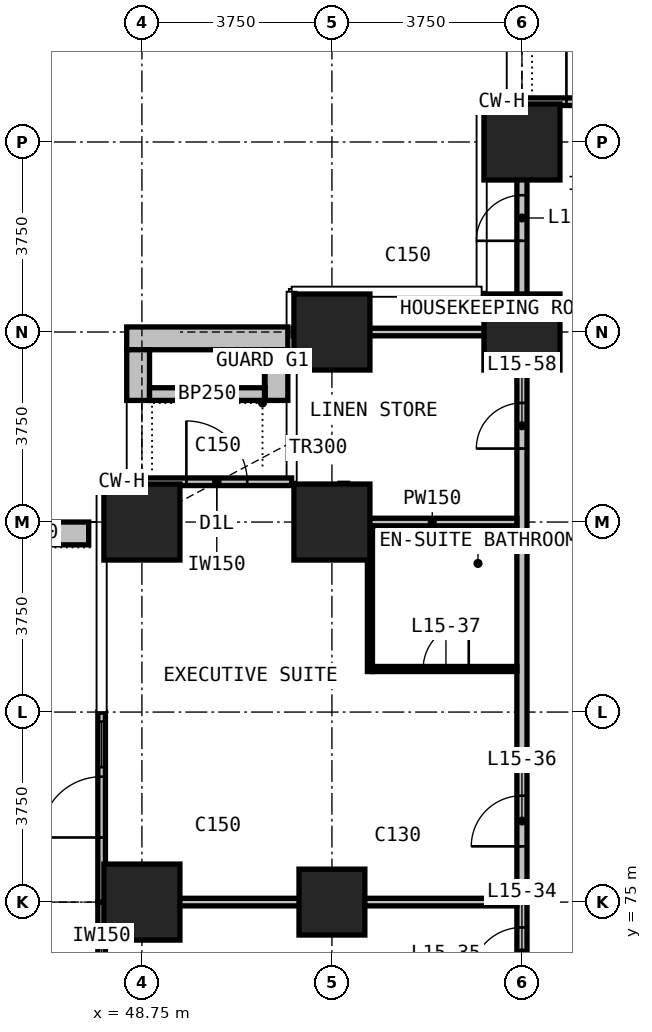
"""IFC4 building model, lengths in metres.
Left out: names, types, materials, properties, quantities, classifications, styles, units other than length and angle.
Written with IfcOpenShell. Run it as: python <this file> out.ifc"""

import sys

from ifc_helpers import new_model, si_unit, direction, frame, frame_2d, origin, origin_2d, place, context, subcontext, project, spatial, rectangle, extrude, element, fill, save


model = new_model("IFC4")
c1 = context("Model", 3, precision=1e-05, world=origin(), true_north=direction((0.0, 1.0)))
c2 = subcontext(c1, "Body", "Model", "MODEL_VIEW")
j1 = project(units=[si_unit("LENGTHUNIT", "METRE"), si_unit("PLANEANGLEUNIT", "RADIAN")], contexts=[c1])
p1 = place(None, origin())
s1 = spatial("IfcSite", under=j1, at=p1, CompositionType="ELEMENT")
p2 = place(p1, origin())
s2 = spatial("IfcBuilding", under=s1, at=p2, CompositionType="ELEMENT")
p3 = place(p2, frame((0.0, 0.0, 69.2)))
s3 = spatial("IfcBuildingStorey", under=s2, at=p3, CompositionType="ELEMENT", Elevation=69.2)
for number, where, z_axis, x_axis in (
    (1, (48.75, 75.0, 0.0), (0.0, 0.0, 1.0), (1.0, 0.0, 0.0)),
    (2, (48.75, 82.5, 0.0), (0.0, 0.0, 1.0), (1.0, 0.0, 0.0)),
):
    element("IfcColumn", number, at=place(p3, frame(where, z_axis=z_axis, x_axis=x_axis)), inside=s3, PredefinedType="COLUMN", context=c2, shape_type="SweptSolid", body=[
        extrude(rectangle(XDim=1.5, YDim=1.5, at=origin_2d()), origin(), (0.0, 0.0, 1.0), 3.3),
    ])
p4 = place(p3, frame((52.5, 75.0, 0.0), z_axis=(0.0, 0.0, 1.0), x_axis=(1.0, 0.0, 0.0)))
e3 = element("IfcColumn", 3, at=p4, inside=s3, PredefinedType="COLUMN", context=c2, shape_type="SweptSolid", body=[
    extrude(rectangle(XDim=1.3, YDim=1.3, at=origin_2d()), origin(), (0.0, 0.0, 1.0), 3.3),
])
for number, where, z_axis, x_axis in (
    (4, (52.5, 82.5, 0.0), (0.0, 0.0, 1.0), (1.0, 0.0, 0.0)),
    (5, (52.5, 86.25, 0.0), (0.0, 0.0, 1.0), (1.0, 0.0, 0.0)),
    (6, (56.25, 86.25, 0.0), (0.0, 0.0, 1.0), (1.0, 0.0, 0.0)),
    (7, (56.25, 90.0, 0.0), (0.0, 0.0, 1.0), (1.0, 0.0, 0.0)),
):
    element("IfcColumn", number, at=place(p3, frame(where, z_axis=z_axis, x_axis=x_axis)), inside=s3, PredefinedType="COLUMN", context=c2, shape_type="SweptSolid", body=[
        extrude(rectangle(XDim=1.5, YDim=1.5, at=origin_2d()), origin(), (0.0, 0.0, 1.0), 3.3),
    ])
p5 = place(p3, frame((56.25, 90.795, 0.0), z_axis=(0.0, 0.0, 1.0), x_axis=(1.0, 0.0, 0.0)))
e8 = element("IfcWall", 8, at=p5, inside=s3, PredefinedType="SOLIDWALL", context=c2, shape_type="SweptSolid", body=[
    extrude(rectangle(XDim=2.955, YDim=0.15, at=frame_2d((1.478, 0.0))), origin(), (0.0, 0.0, 1.0), 3.0),
])
p6 = place(p5, frame((0.877, 0.0, 0.0)))
e9 = element("IfcOpeningElement", 9, at=p6, cuts=e8, PredefinedType="OPENING", context=c2, shape_type="SweptSolid", body=[
    extrude(rectangle(XDim=1.2, YDim=2.4, at=frame_2d((0.6, 1.2))), frame((0.0, 0.085, 0.0), z_axis=(0.0, -1.0, 0.0), x_axis=(1.0, 0.0, 0.0)), (0.0, 0.0, 1.0), 0.17),
])
p7 = place(p3, frame((48.75, 83.295, 0.0), z_axis=(0.0, 0.0, 1.0), x_axis=(1.0, 0.0, 0.0)))
e10 = element("IfcWall", 10, at=p7, inside=s3, PredefinedType="SOLIDWALL", context=c2, shape_type="SweptSolid", body=[
    extrude(rectangle(XDim=2.955, YDim=0.15, at=frame_2d((1.478, 0.0))), origin(), (0.0, 0.0, 1.0), 3.0),
])
p8 = place(p7, frame((0.877, 0.0, 0.0)))
e11 = element("IfcOpeningElement", 11, at=p8, cuts=e10, PredefinedType="OPENING", context=c2, shape_type="SweptSolid", body=[
    extrude(rectangle(XDim=1.2, YDim=2.0, at=frame_2d((0.6, 1.0))), frame((0.0, 0.085, 0.0), z_axis=(0.0, -1.0, 0.0), x_axis=(1.0, 0.0, 0.0)), (0.0, 0.0, 1.0), 0.17),
])
p9 = place(p3, frame((47.955, 71.25, 0.0), z_axis=(0.0, 0.0, 1.0), x_axis=(0.0, 1.0, 0.0)))
e12 = element("IfcWall", 12, at=p9, inside=s3, PredefinedType="SOLIDWALL", context=c2, shape_type="SweptSolid", body=[
    extrude(rectangle(XDim=3.75, YDim=0.15, at=frame_2d((1.875, 0.0))), origin(), (0.0, 0.0, 1.0), 3.0),
])
p10 = place(p9, frame((0.188, 0.0, 0.1)))
e13 = element("IfcOpeningElement", 13, at=p10, cuts=e12, PredefinedType="OPENING", context=c2, shape_type="SweptSolid", body=[
    extrude(rectangle(XDim=0.9, YDim=2.4, at=frame_2d((0.45, 1.2))), frame((0.0, 0.085, 0.0), z_axis=(0.0, -1.0, 0.0), x_axis=(1.0, 0.0, 0.0)), (0.0, 0.0, 1.0), 0.17),
])
p11 = place(p9, frame((1.275, 0.0, 0.0)))
e14 = element("IfcOpeningElement", 14, at=p11, cuts=e12, PredefinedType="OPENING", context=c2, shape_type="SweptSolid", body=[
    extrude(rectangle(XDim=1.2, YDim=2.4, at=frame_2d((0.6, 1.2))), frame((0.0, 0.085, 0.0), z_axis=(0.0, -1.0, 0.0), x_axis=(1.0, 0.0, 0.0)), (0.0, 0.0, 1.0), 0.17),
])
p12 = place(p3, frame((47.955, 75.0, 0.0), z_axis=(0.0, 0.0, 1.0), x_axis=(0.0, 1.0, 0.0)))
e15 = element("IfcWall", 15, at=p12, inside=s3, PredefinedType="SOLIDWALL", context=c2, shape_type="SweptSolid", body=[
    extrude(rectangle(XDim=3.75, YDim=0.15, at=frame_2d((1.875, 0.0))), origin(), (0.0, 0.0, 1.0), 3.0),
])
p13 = place(p12, frame((1.275, 0.0, 0.0)))
e16 = element("IfcOpeningElement", 16, at=p13, cuts=e15, PredefinedType="OPENING", context=c2, shape_type="SweptSolid", body=[
    extrude(rectangle(XDim=1.2, YDim=2.4, at=frame_2d((0.6, 1.2))), frame((0.0, 0.085, 0.0), z_axis=(0.0, -1.0, 0.0), x_axis=(1.0, 0.0, 0.0)), (0.0, 0.0, 1.0), 0.17),
])
p14 = place(p12, frame((2.663, 0.0, 0.1)))
e17 = element("IfcOpeningElement", 17, at=p14, cuts=e15, PredefinedType="OPENING", context=c2, shape_type="SweptSolid", body=[
    extrude(rectangle(XDim=0.9, YDim=2.4, at=frame_2d((0.45, 1.2))), frame((0.0, 0.085, 0.0), z_axis=(0.0, -1.0, 0.0), x_axis=(1.0, 0.0, 0.0)), (0.0, 0.0, 1.0), 0.17),
])
p15 = place(p3, frame((48.45, 86.125, 0.0), z_axis=(0.0, 0.0, 1.0), x_axis=(1.0, 0.0, 0.0)))
e18 = element("IfcWall", 18, at=p15, inside=s3, PredefinedType="USERDEFINED", context=c2, shape_type="SweptSolid", body=[
    extrude(rectangle(XDim=3.18, YDim=0.45, at=frame_2d((1.59, 0.0))), origin(), (0.0, 0.0, 1.0), 1.1),
])
for number, where, z_axis, x_axis in (
    (19, (48.675, 84.9, 0.0), (0.0, 0.0, 1.0), (0.0, 1.0, 0.0)),
    (20, (51.405, 84.9, 0.0), (0.0, 0.0, 1.0), (0.0, 1.0, 0.0)),
):
    element("IfcWall", number, at=place(p3, frame(where, z_axis=z_axis, x_axis=x_axis)), inside=s3, PredefinedType="USERDEFINED", context=c2, shape_type="SweptSolid", body=[
        extrude(rectangle(XDim=1.0, YDim=0.45, at=frame_2d((0.5, 0.0))), origin(), (0.0, 0.0, 1.0), 1.1),
    ])
p16 = place(p3, frame((48.9, 85.025, 0.0), z_axis=(0.0, 0.0, 1.0), x_axis=(1.0, 0.0, 0.0)))
e21 = element("IfcWall", 21, at=p16, inside=s3, PredefinedType="USERDEFINED", context=c2, shape_type="SweptSolid", body=[
    extrude(rectangle(XDim=2.28, YDim=0.25, at=frame_2d((1.14, 0.0))), origin(), (0.0, 0.0, 1.0), 1.0),
])
p17 = place(p3, frame((47.7, 82.275, 0.0), z_axis=(0.0, 0.0, 1.0), x_axis=(-1.0, 0.0, 0.0)))
e22 = element("IfcWall", 22, at=p17, inside=s3, PredefinedType="USERDEFINED", context=c2, shape_type="SweptSolid", body=[
    extrude(rectangle(XDim=2.35, YDim=0.45, at=frame_2d((1.175, 0.0))), origin(), (0.0, 0.0, 1.0), 1.1),
])
p18 = place(p3, frame((56.25, 52.4, 0.0), z_axis=(0.0, 0.0, 1.0), x_axis=(0.0, 1.0, 0.0)))
e23 = element("IfcWall", 23, at=p18, inside=s3, PredefinedType="PARTITIONING", context=c2, shape_type="SweptSolid", body=[
    extrude(rectangle(XDim=38.31, YDim=0.2, at=frame_2d((19.155, 0.0))), origin(), (0.0, 0.0, 1.0), 3.0),
])
p19 = place(p18, frame((2.35, 0.0, 0.0)))
e24 = element("IfcOpeningElement", 24, at=p19, cuts=e23, PredefinedType="OPENING", context=c2, shape_type="SweptSolid", body=[
    extrude(rectangle(XDim=1.0, YDim=2.2, at=frame_2d((0.5, 1.1))), frame((0.0, 0.11, 0.0), z_axis=(0.0, -1.0, 0.0), x_axis=(1.0, 0.0, 0.0)), (0.0, 0.0, 1.0), 0.22),
])
p20 = place(p18, frame((4.35, 0.0, 0.0)))
e25 = element("IfcOpeningElement", 25, at=p20, cuts=e23, PredefinedType="OPENING", context=c2, shape_type="SweptSolid", body=[
    extrude(rectangle(XDim=1.0, YDim=2.2, at=frame_2d((0.5, 1.1))), frame((0.0, 0.11, 0.0), z_axis=(0.0, -1.0, 0.0), x_axis=(1.0, 0.0, 0.0)), (0.0, 0.0, 1.0), 0.22),
])
p21 = place(p18, frame((13.0, 0.0, 0.0)))
e26 = element("IfcOpeningElement", 26, at=p21, cuts=e23, PredefinedType="OPENING", context=c2, shape_type="SweptSolid", body=[
    extrude(rectangle(XDim=1.0, YDim=2.2, at=frame_2d((0.5, 1.1))), frame((0.0, 0.11, 0.0), z_axis=(0.0, -1.0, 0.0), x_axis=(1.0, 0.0, 0.0)), (0.0, 0.0, 1.0), 0.22),
])
p22 = place(p18, frame((15.6, 0.0, 0.0)))
e27 = element("IfcOpeningElement", 27, at=p22, cuts=e23, PredefinedType="OPENING", context=c2, shape_type="SweptSolid", body=[
    extrude(rectangle(XDim=1.0, YDim=2.2, at=frame_2d((0.5, 1.1))), frame((0.0, 0.11, 0.0), z_axis=(0.0, -1.0, 0.0), x_axis=(1.0, 0.0, 0.0)), (0.0, 0.0, 1.0), 0.22),
])
p23 = place(p18, frame((21.1, 0.0, 0.0)))
e28 = element("IfcOpeningElement", 28, at=p23, cuts=e23, PredefinedType="OPENING", context=c2, shape_type="SweptSolid", body=[
    extrude(rectangle(XDim=1.0, YDim=2.2, at=frame_2d((0.5, 1.1))), frame((0.0, 0.11, 0.0), z_axis=(0.0, -1.0, 0.0), x_axis=(1.0, 0.0, 0.0)), (0.0, 0.0, 1.0), 0.22),
])
p24 = place(p18, frame((23.7, 0.0, 0.0)))
e29 = element("IfcOpeningElement", 29, at=p24, cuts=e23, PredefinedType="OPENING", context=c2, shape_type="SweptSolid", body=[
    extrude(rectangle(XDim=1.0, YDim=2.2, at=frame_2d((0.5, 1.1))), frame((0.0, 0.11, 0.0), z_axis=(0.0, -1.0, 0.0), x_axis=(1.0, 0.0, 0.0)), (0.0, 0.0, 1.0), 0.22),
])
p25 = place(p18, frame((31.55, 0.0, 0.0)))
e30 = element("IfcOpeningElement", 30, at=p25, cuts=e23, PredefinedType="OPENING", context=c2, shape_type="SweptSolid", body=[
    extrude(rectangle(XDim=0.9, YDim=2.2, at=frame_2d((0.45, 1.1))), frame((0.0, 0.11, 0.0), z_axis=(0.0, -1.0, 0.0), x_axis=(1.0, 0.0, 0.0)), (0.0, 0.0, 1.0), 0.22),
])
p26 = place(p18, frame((35.65, 0.0, 0.0)))
e31 = element("IfcOpeningElement", 31, at=p26, cuts=e23, PredefinedType="OPENING", context=c2, shape_type="SweptSolid", body=[
    extrude(rectangle(XDim=0.9, YDim=2.2, at=frame_2d((0.45, 1.1))), frame((0.0, 0.11, 0.0), z_axis=(0.0, -1.0, 0.0), x_axis=(1.0, 0.0, 0.0)), (0.0, 0.0, 1.0), 0.22),
])
p27 = place(p3, frame((48.04, 75.0, 0.0), z_axis=(0.0, 0.0, 1.0), x_axis=(1.0, 0.0, 0.0)))
e32 = element("IfcWall", 32, at=p27, inside=s3, PredefinedType="PARTITIONING", context=c2, shape_type="SweptSolid", body=[
    extrude(rectangle(XDim=8.11, YDim=0.15, at=frame_2d((4.055, 0.0))), origin(), (0.0, 0.0, 1.0), 3.0),
])
p28 = place(p3, frame((52.81, 82.5, 0.0), z_axis=(0.0, 0.0, 1.0), x_axis=(1.0, 0.0, 0.0)))
e33 = element("IfcWall", 33, at=p28, inside=s3, PredefinedType="PARTITIONING", context=c2, shape_type="SweptSolid", body=[
    extrude(rectangle(XDim=3.34, YDim=0.15, at=frame_2d((1.67, 0.0))), origin(), (0.0, 0.0, 1.0), 3.0),
])
p29 = place(p3, frame((51.735, 86.25, 0.0), z_axis=(0.0, 0.0, 1.0), x_axis=(1.0, 0.0, 0.0)))
e34 = element("IfcWall", 34, at=p29, inside=s3, PredefinedType="PARTITIONING", context=c2, shape_type="SweptSolid", body=[
    extrude(rectangle(XDim=4.415, YDim=0.15, at=frame_2d((2.208, 0.0))), origin(), (0.0, 0.0, 1.0), 3.0),
])
p30 = place(p3, frame((52.735, 82.425, 0.0), z_axis=(0.0, 0.0, 1.0), x_axis=(0.0, 1.0, 0.0)))
e35 = element("IfcWall", 35, at=p30, inside=s3, PredefinedType="PARTITIONING", context=c2, shape_type="SweptSolid", body=[
    extrude(rectangle(XDim=0.84, YDim=0.15, at=frame_2d((0.42, 0.0))), origin(), (0.0, 0.0, 1.0), 3.0),
])
p31 = place(p3, frame((53.3, 79.6, 0.0), z_axis=(0.0, 0.0, 1.0), x_axis=(1.0, 0.0, 0.0)))
e36 = element("IfcWall", 36, at=p31, inside=s3, PredefinedType="PARTITIONING", context=c2, shape_type="SweptSolid", body=[
    extrude(rectangle(XDim=2.85, YDim=0.1, at=frame_2d((1.425, 0.0))), origin(), (0.0, 0.0, 1.0), 3.0),
])
p32 = place(p31, frame((1.0, 0.0, 0.0)))
e37 = element("IfcOpeningElement", 37, at=p32, cuts=e36, PredefinedType="OPENING", context=c2, shape_type="SweptSolid", body=[
    extrude(rectangle(XDim=0.9, YDim=2.2, at=frame_2d((0.45, 1.1))), frame((0.0, 0.06, 0.0), z_axis=(0.0, -1.0, 0.0), x_axis=(1.0, 0.0, 0.0)), (0.0, 0.0, 1.0), 0.12),
])
p33 = place(p3, frame((53.25, 79.55, 0.0), z_axis=(0.0, 0.0, 1.0), x_axis=(0.0, 1.0, 0.0)))
e38 = element("IfcWall", 38, at=p33, inside=s3, PredefinedType="PARTITIONING", context=c2, shape_type="SweptSolid", body=[
    extrude(rectangle(XDim=2.875, YDim=0.1, at=frame_2d((1.438, 0.0))), origin(), (0.0, 0.0, 1.0), 3.0),
])
p34 = place(p6, origin())
e39 = element("IfcDoor", 39, at=p34, inside=s3, OperationType="SINGLE_SWING_LEFT", PredefinedType="DOOR", context=c2, shape_type="SweptSolid", body=[
    extrude(rectangle(XDim=1.2, YDim=2.4, at=frame_2d((0.6, 1.2))), frame((0.0, 0.025, 0.0), z_axis=(0.0, -1.0, 0.0), x_axis=(1.0, 0.0, 0.0)), (0.0, 0.0, 1.0), 0.05),
])
fill(e9, e39)
p35 = place(p8, origin())
e40 = element("IfcDoor", 40, at=p35, inside=s3, OperationType="SINGLE_SWING_LEFT", PredefinedType="DOOR", context=c2, shape_type="SweptSolid", body=[
    extrude(rectangle(XDim=1.2, YDim=2.0, at=frame_2d((0.6, 1.0))), frame((0.0, 0.025, 0.0), z_axis=(0.0, -1.0, 0.0), x_axis=(1.0, 0.0, 0.0)), (0.0, 0.0, 1.0), 0.05),
])
fill(e11, e40)
p36 = place(p13, origin())
e41 = element("IfcDoor", 41, at=p36, inside=s3, OperationType="SINGLE_SWING_LEFT", PredefinedType="DOOR", context=c2, shape_type="SweptSolid", body=[
    extrude(rectangle(XDim=1.2, YDim=2.4, at=frame_2d((0.6, 1.2))), frame((0.0, 0.025, 0.0), z_axis=(0.0, -1.0, 0.0), x_axis=(1.0, 0.0, 0.0)), (0.0, 0.0, 1.0), 0.05),
])
fill(e16, e41)
p37 = place(p14, origin())
e42 = element("IfcWindow", 42, at=p37, inside=s3, PartitioningType="SINGLE_PANEL", PredefinedType="WINDOW", context=c2, shape_type="SweptSolid", body=[
    extrude(rectangle(XDim=0.9, YDim=2.4, at=frame_2d((0.45, 1.2))), frame((0.0, 0.03, 0.0), z_axis=(0.0, -1.0, 0.0), x_axis=(1.0, 0.0, 0.0)), (0.0, 0.0, 1.0), 0.06),
])
fill(e17, e42)
p38 = place(p23, origin())
e43 = element("IfcDoor", 43, at=p38, inside=s3, OperationType="SINGLE_SWING_RIGHT", PredefinedType="DOOR", context=c2, shape_type="SweptSolid", body=[
    extrude(rectangle(XDim=1.0, YDim=2.2, at=frame_2d((0.5, 1.1))), frame((0.0, 0.025, 0.0), z_axis=(0.0, -1.0, 0.0), x_axis=(1.0, 0.0, 0.0)), (0.0, 0.0, 1.0), 0.05),
])
fill(e28, e43)
p39 = place(p24, origin())
e44 = element("IfcDoor", 44, at=p39, inside=s3, OperationType="SINGLE_SWING_LEFT", PredefinedType="DOOR", context=c2, shape_type="SweptSolid", body=[
    extrude(rectangle(XDim=1.0, YDim=2.2, at=frame_2d((0.5, 1.1))), frame((0.0, 0.025, 0.0), z_axis=(0.0, -1.0, 0.0), x_axis=(1.0, 0.0, 0.0)), (0.0, 0.0, 1.0), 0.05),
])
fill(e29, e44)
p40 = place(p32, origin())
e45 = element("IfcDoor", 45, at=p40, inside=s3, OperationType="SINGLE_SWING_RIGHT", PredefinedType="DOOR", context=c2, shape_type="SweptSolid", body=[
    extrude(rectangle(XDim=0.9, YDim=2.2, at=frame_2d((0.45, 1.1))), frame((0.0, 0.025, 0.0), z_axis=(0.0, -1.0, 0.0), x_axis=(1.0, 0.0, 0.0)), (0.0, 0.0, 1.0), 0.05),
])
fill(e37, e45)
p41 = place(p25, origin())
e46 = element("IfcDoor", 46, at=p41, inside=s3, OperationType="SINGLE_SWING_RIGHT", PredefinedType="DOOR", context=c2, shape_type="SweptSolid", body=[
    extrude(rectangle(XDim=0.9, YDim=2.2, at=frame_2d((0.45, 1.1))), frame((0.0, 0.025, 0.0), z_axis=(0.0, -1.0, 0.0), x_axis=(1.0, 0.0, 0.0)), (0.0, 0.0, 1.0), 0.05),
])
fill(e30, e46)
p42 = place(p26, origin())
e47 = element("IfcDoor", 47, at=p42, inside=s3, OperationType="SINGLE_SWING_RIGHT", PredefinedType="DOOR", context=c2, shape_type="SweptSolid", body=[
    extrude(rectangle(XDim=0.9, YDim=2.2, at=frame_2d((0.45, 1.1))), frame((0.0, 0.025, 0.0), z_axis=(0.0, -1.0, 0.0), x_axis=(1.0, 0.0, 0.0)), (0.0, 0.0, 1.0), 0.05),
])
fill(e31, e47)
save(model, sys.argv[1])
